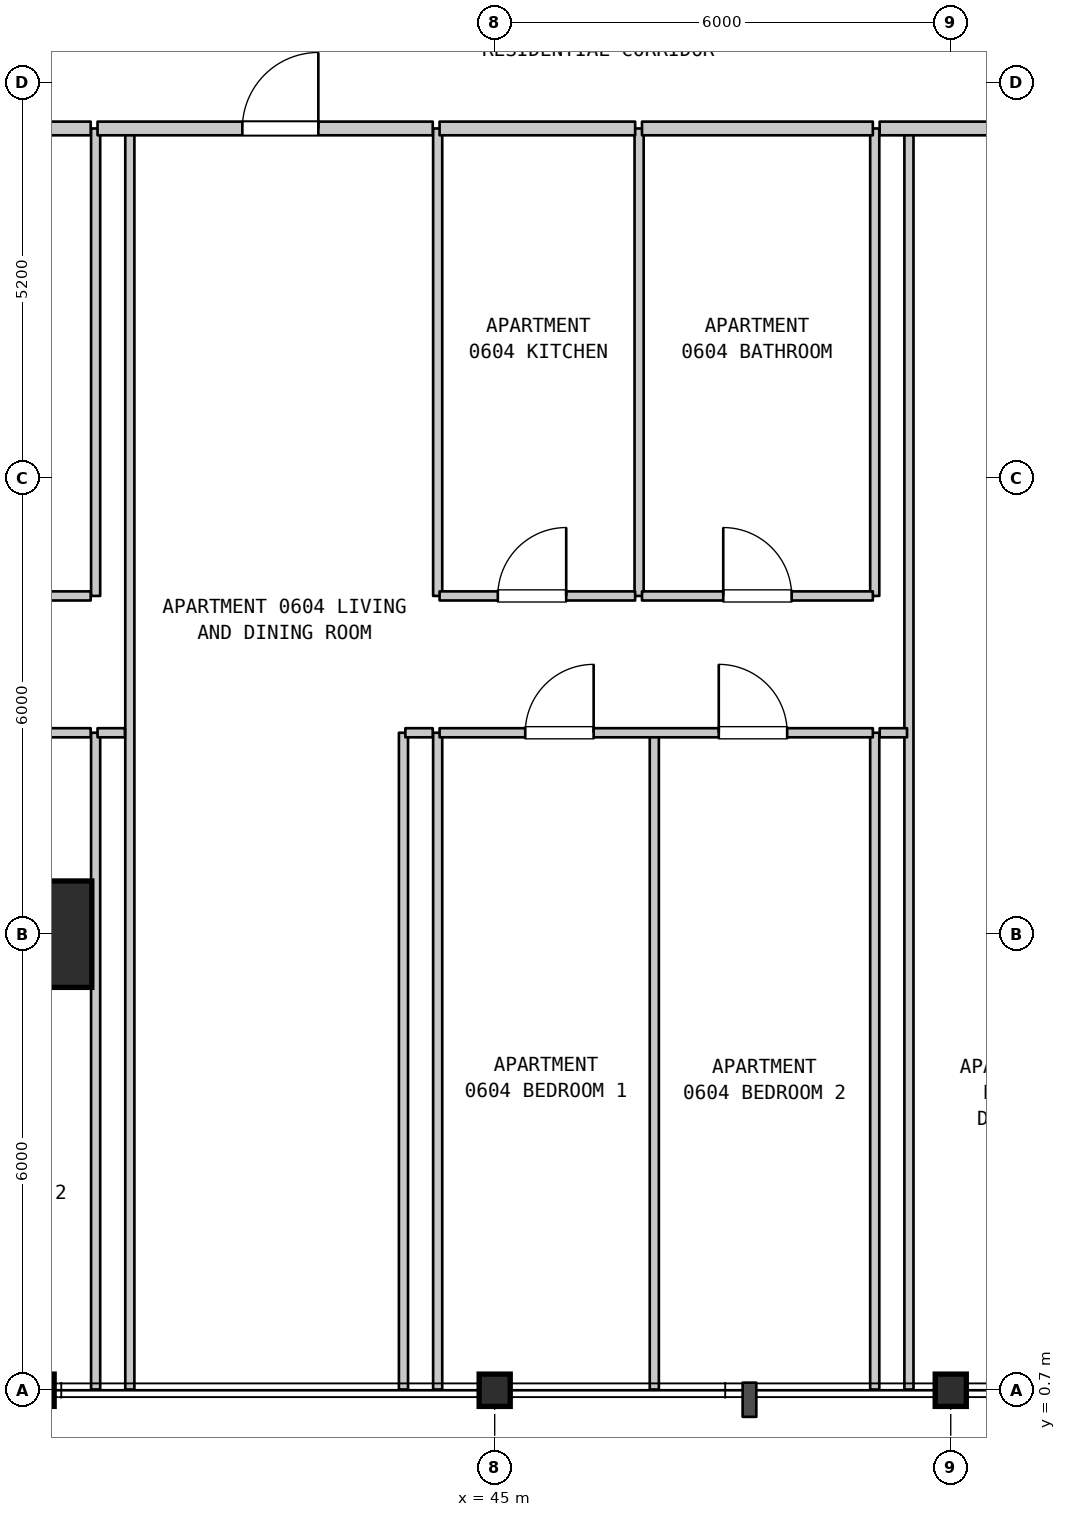
"""IFC4 building model, lengths in metres.
Left out: names, types, materials, properties, quantities, classifications, styles, units other than length and angle.
Written with IfcOpenShell. Run it as: python <this file> out.ifc"""

import sys

from ifc_helpers import new_model, si_unit, direction, frame, frame_2d, origin, origin_2d, place, context, subcontext, project, spatial, rectangle, i_section, extrude, element, fill, save


model = new_model("IFC4")
c1 = context("Model", 3, precision=1e-05, world=origin(), true_north=direction((0.0, 1.0)))
c2 = subcontext(c1, "Body", "Model", "MODEL_VIEW")
j1 = project(units=[si_unit("LENGTHUNIT", "METRE"), si_unit("PLANEANGLEUNIT", "RADIAN")], contexts=[c1])
p1 = place(None, origin())
s1 = spatial("IfcSite", under=j1, at=p1, CompositionType="ELEMENT")
p2 = place(p1, origin())
s2 = spatial("IfcBuilding", under=s1, at=p2, CompositionType="ELEMENT")
p3 = place(p2, frame((0.0, 0.0, 31.4)))
s3 = spatial("IfcBuildingStorey", under=s2, at=p3, CompositionType="ELEMENT", Elevation=31.4)
p4 = place(p3, frame((39.0, 0.7, 0.0), z_axis=(0.0, 0.0, 1.0), x_axis=(1.0, 0.0, 0.0)))
e1 = element("IfcColumn", 1, at=p4, inside=s3, PredefinedType="COLUMN", context=c2, shape_type="SweptSolid", body=[
    extrude(i_section(OverallWidth=0.409, OverallDepth=0.425, WebThickness=0.032, FlangeThickness=0.052, FilletRadius=0.015, at=origin_2d()), origin(), (0.0, 0.0, 1.0), 3.7),
])
p5 = place(p3, frame((39.0, 6.7, 0.0), z_axis=(0.0, 0.0, 1.0), x_axis=(1.0, 0.0, 0.0)))
e2 = element("IfcColumn", 2, at=p5, inside=s3, PredefinedType="COLUMN", context=c2, shape_type="SweptSolid", body=[
    extrude(rectangle(XDim=1.4, YDim=1.4, at=origin_2d()), origin(), (0.0, 0.0, 1.0), 3.7),
])
for number, where, z_axis, x_axis in (
    (3, (45.0, 0.7, 0.0), (0.0, 0.0, 1.0), (1.0, 0.0, 0.0)),
    (4, (51.0, 0.7, 0.0), (0.0, 0.0, 1.0), (1.0, 0.0, 0.0)),
):
    element("IfcColumn", number, at=place(p3, frame(where, z_axis=z_axis, x_axis=x_axis)), inside=s3, PredefinedType="COLUMN", context=c2, shape_type="SweptSolid", body=[
        extrude(i_section(OverallWidth=0.409, OverallDepth=0.425, WebThickness=0.032, FlangeThickness=0.052, FilletRadius=0.015, at=origin_2d()), origin(), (0.0, 0.0, 1.0), 3.7),
    ])
p6 = place(p3, frame((39.75, 0.71, 0.0), z_axis=(0.0, 0.0, 1.0), x_axis=(0.0, 1.0, 0.0)))
e5 = element("IfcWall", 5, at=p6, inside=s3, PredefinedType="PARTITIONING", context=c2, shape_type="SweptSolid", body=[
    extrude(rectangle(XDim=8.64, YDim=0.12, at=frame_2d((4.32, 0.0))), origin(), (0.0, 0.0, 1.0), 3.385),
])
p7 = place(p3, frame((39.75, 11.15, 0.0), z_axis=(0.0, 0.0, 1.0), x_axis=(0.0, 1.0, 0.0)))
e6 = element("IfcWall", 6, at=p7, inside=s3, PredefinedType="PARTITIONING", context=c2, shape_type="SweptSolid", body=[
    extrude(rectangle(XDim=6.15, YDim=0.12, at=frame_2d((3.075, 0.0))), origin(), (0.0, 0.0, 1.0), 3.385),
])
p8 = place(p3, frame((40.2, 0.71, 0.0), z_axis=(0.0, 0.0, 1.0), x_axis=(0.0, 1.0, 0.0)))
e7 = element("IfcWall", 7, at=p8, inside=s3, PredefinedType="PARTITIONING", context=c2, shape_type="SweptSolid", body=[
    extrude(rectangle(XDim=16.59, YDim=0.12, at=frame_2d((8.295, 0.0))), origin(), (0.0, 0.0, 1.0), 3.385),
])
for number, where, z_axis, x_axis in (
    (8, (43.8, 0.71, 0.0), (0.0, 0.0, 1.0), (0.0, 1.0, 0.0)),
    (9, (44.25, 0.71, 0.0), (0.0, 0.0, 1.0), (0.0, 1.0, 0.0)),
):
    element("IfcWall", number, at=place(p3, frame(where, z_axis=z_axis, x_axis=x_axis)), inside=s3, PredefinedType="PARTITIONING", context=c2, shape_type="SweptSolid", body=[
        extrude(rectangle(XDim=8.64, YDim=0.12, at=frame_2d((4.32, 0.0))), origin(), (0.0, 0.0, 1.0), 3.385),
    ])
for number, where, z_axis, x_axis in (
    (10, (44.25, 11.15, 0.0), (0.0, 0.0, 1.0), (0.0, 1.0, 0.0)),
    (11, (46.9, 11.15, 0.0), (0.0, 0.0, 1.0), (0.0, 1.0, 0.0)),
):
    element("IfcWall", number, at=place(p3, frame(where, z_axis=z_axis, x_axis=x_axis)), inside=s3, PredefinedType="PARTITIONING", context=c2, shape_type="SweptSolid", body=[
        extrude(rectangle(XDim=6.15, YDim=0.12, at=frame_2d((3.075, 0.0))), origin(), (0.0, 0.0, 1.0), 3.385),
    ])
for number, where, z_axis, x_axis in (
    (12, (47.1, 0.71, 0.0), (0.0, 0.0, 1.0), (0.0, 1.0, 0.0)),
    (13, (50.0, 0.71, 0.0), (0.0, 0.0, 1.0), (0.0, 1.0, 0.0)),
):
    element("IfcWall", number, at=place(p3, frame(where, z_axis=z_axis, x_axis=x_axis)), inside=s3, PredefinedType="PARTITIONING", context=c2, shape_type="SweptSolid", body=[
        extrude(rectangle(XDim=8.64, YDim=0.12, at=frame_2d((4.32, 0.0))), origin(), (0.0, 0.0, 1.0), 3.385),
    ])
p9 = place(p3, frame((50.0, 11.15, 0.0), z_axis=(0.0, 0.0, 1.0), x_axis=(0.0, 1.0, 0.0)))
e14 = element("IfcWall", 14, at=p9, inside=s3, PredefinedType="PARTITIONING", context=c2, shape_type="SweptSolid", body=[
    extrude(rectangle(XDim=6.15, YDim=0.12, at=frame_2d((3.075, 0.0))), origin(), (0.0, 0.0, 1.0), 3.385),
])
p10 = place(p3, frame((50.45, 0.71, 0.0), z_axis=(0.0, 0.0, 1.0), x_axis=(0.0, 1.0, 0.0)))
e15 = element("IfcWall", 15, at=p10, inside=s3, PredefinedType="PARTITIONING", context=c2, shape_type="SweptSolid", body=[
    extrude(rectangle(XDim=16.59, YDim=0.12, at=frame_2d((8.295, 0.0))), origin(), (0.0, 0.0, 1.0), 3.385),
])
p11 = place(p3, frame((33.985, 9.35, 0.0), z_axis=(0.0, 0.0, 1.0), x_axis=(1.0, 0.0, 0.0)))
e16 = element("IfcWall", 16, at=p11, inside=s3, PredefinedType="PARTITIONING", context=c2, shape_type="SweptSolid", body=[
    extrude(rectangle(XDim=5.7, YDim=0.12, at=frame_2d((2.85, 0.0))), origin(), (0.0, 0.0, 1.0), 3.385),
])
p12 = place(p11, frame((1.127, 0.0, 0.0)))
e17 = element("IfcOpeningElement", 17, at=p12, cuts=e16, PredefinedType="OPENING", context=c2, shape_type="SweptSolid", body=[
    extrude(rectangle(XDim=0.9, YDim=2.15, at=frame_2d((0.45, 1.075))), frame((0.0, 0.07, 0.0), z_axis=(0.0, -1.0, 0.0), x_axis=(1.0, 0.0, 0.0)), (0.0, 0.0, 1.0), 0.14),
])
p13 = place(p11, frame((3.673, 0.0, 0.0)))
e18 = element("IfcOpeningElement", 18, at=p13, cuts=e16, PredefinedType="OPENING", context=c2, shape_type="SweptSolid", body=[
    extrude(rectangle(XDim=0.9, YDim=2.15, at=frame_2d((0.45, 1.075))), frame((0.0, 0.07, 0.0), z_axis=(0.0, -1.0, 0.0), x_axis=(1.0, 0.0, 0.0)), (0.0, 0.0, 1.0), 0.14),
])
for number, where, z_axis, x_axis in (
    (19, (39.775, 9.35, 0.0), (0.0, 0.0, 1.0), (1.0, 0.0, 0.0)),
    (20, (43.825, 9.35, 0.0), (0.0, 0.0, 1.0), (1.0, 0.0, 0.0)),
):
    element("IfcWall", number, at=place(p3, frame(where, z_axis=z_axis, x_axis=x_axis)), inside=s3, PredefinedType="PARTITIONING", context=c2, shape_type="SweptSolid", body=[
        extrude(rectangle(XDim=0.36, YDim=0.12, at=frame_2d((0.18, 0.0))), origin(), (0.0, 0.0, 1.0), 3.385),
    ])
p14 = place(p3, frame((44.275, 9.35, 0.0), z_axis=(0.0, 0.0, 1.0), x_axis=(1.0, 0.0, 0.0)))
e21 = element("IfcWall", 21, at=p14, inside=s3, PredefinedType="PARTITIONING", context=c2, shape_type="SweptSolid", body=[
    extrude(rectangle(XDim=5.7, YDim=0.12, at=frame_2d((2.85, 0.0))), origin(), (0.0, 0.0, 1.0), 3.385),
])
p15 = place(p14, frame((1.127, 0.0, 0.0)))
e22 = element("IfcOpeningElement", 22, at=p15, cuts=e21, PredefinedType="OPENING", context=c2, shape_type="SweptSolid", body=[
    extrude(rectangle(XDim=0.9, YDim=2.15, at=frame_2d((0.45, 1.075))), frame((0.0, 0.07, 0.0), z_axis=(0.0, -1.0, 0.0), x_axis=(1.0, 0.0, 0.0)), (0.0, 0.0, 1.0), 0.14),
])
p16 = place(p14, frame((3.673, 0.0, 0.0)))
e23 = element("IfcOpeningElement", 23, at=p16, cuts=e21, PredefinedType="OPENING", context=c2, shape_type="SweptSolid", body=[
    extrude(rectangle(XDim=0.9, YDim=2.15, at=frame_2d((0.45, 1.075))), frame((0.0, 0.07, 0.0), z_axis=(0.0, -1.0, 0.0), x_axis=(1.0, 0.0, 0.0)), (0.0, 0.0, 1.0), 0.14),
])
p17 = place(p3, frame((50.065, 9.35, 0.0), z_axis=(0.0, 0.0, 1.0), x_axis=(1.0, 0.0, 0.0)))
e24 = element("IfcWall", 24, at=p17, inside=s3, PredefinedType="PARTITIONING", context=c2, shape_type="SweptSolid", body=[
    extrude(rectangle(XDim=0.36, YDim=0.12, at=frame_2d((0.18, 0.0))), origin(), (0.0, 0.0, 1.0), 3.385),
])
p18 = place(p3, frame((36.648, 11.15, 0.0), z_axis=(0.0, 0.0, 1.0), x_axis=(1.0, 0.0, 0.0)))
e25 = element("IfcWall", 25, at=p18, inside=s3, PredefinedType="PARTITIONING", context=c2, shape_type="SweptSolid", body=[
    extrude(rectangle(XDim=3.037, YDim=0.12, at=frame_2d((1.519, 0.0))), origin(), (0.0, 0.0, 1.0), 3.385),
])
p19 = place(p18, frame((1.068, 0.0, 0.0)))
e26 = element("IfcOpeningElement", 26, at=p19, cuts=e25, PredefinedType="OPENING", context=c2, shape_type="SweptSolid", body=[
    extrude(rectangle(XDim=0.9, YDim=2.1, at=frame_2d((0.45, 1.05))), frame((0.0, 0.07, 0.0), z_axis=(0.0, -1.0, 0.0), x_axis=(1.0, 0.0, 0.0)), (0.0, 0.0, 1.0), 0.14),
])
p20 = place(p3, frame((44.275, 11.15, 0.0), z_axis=(0.0, 0.0, 1.0), x_axis=(1.0, 0.0, 0.0)))
e27 = element("IfcWall", 27, at=p20, inside=s3, PredefinedType="PARTITIONING", context=c2, shape_type="SweptSolid", body=[
    extrude(rectangle(XDim=2.573, YDim=0.12, at=frame_2d((1.287, 0.0))), origin(), (0.0, 0.0, 1.0), 3.385),
])
p21 = place(p20, frame((0.766, 0.0, 0.0)))
e28 = element("IfcOpeningElement", 28, at=p21, cuts=e27, PredefinedType="OPENING", context=c2, shape_type="SweptSolid", body=[
    extrude(rectangle(XDim=0.9, YDim=2.15, at=frame_2d((0.45, 1.075))), frame((0.0, 0.07, 0.0), z_axis=(0.0, -1.0, 0.0), x_axis=(1.0, 0.0, 0.0)), (0.0, 0.0, 1.0), 0.14),
])
p22 = place(p3, frame((46.938, 11.15, 0.0), z_axis=(0.0, 0.0, 1.0), x_axis=(1.0, 0.0, 0.0)))
e29 = element("IfcWall", 29, at=p22, inside=s3, PredefinedType="PARTITIONING", context=c2, shape_type="SweptSolid", body=[
    extrude(rectangle(XDim=3.037, YDim=0.12, at=frame_2d((1.519, 0.0))), origin(), (0.0, 0.0, 1.0), 3.385),
])
p23 = place(p22, frame((1.069, 0.0, 0.0)))
e30 = element("IfcOpeningElement", 30, at=p23, cuts=e29, PredefinedType="OPENING", context=c2, shape_type="SweptSolid", body=[
    extrude(rectangle(XDim=0.9, YDim=2.1, at=frame_2d((0.45, 1.05))), frame((0.0, 0.07, 0.0), z_axis=(0.0, -1.0, 0.0), x_axis=(1.0, 0.0, 0.0)), (0.0, 0.0, 1.0), 0.14),
])
p24 = place(p3, frame((36.648, 17.3, 0.0), z_axis=(0.0, 0.0, 1.0), x_axis=(1.0, 0.0, 0.0)))
e31 = element("IfcWall", 31, at=p24, inside=s3, PredefinedType="STANDARD", context=c2, shape_type="SweptSolid", body=[
    extrude(rectangle(XDim=3.037, YDim=0.18, at=frame_2d((1.519, 0.0))), origin(), (0.0, 0.0, 1.0), 3.385),
])
p25 = place(p3, frame((39.775, 17.3, 0.0), z_axis=(0.0, 0.0, 1.0), x_axis=(1.0, 0.0, 0.0)))
e32 = element("IfcWall", 32, at=p25, inside=s3, PredefinedType="STANDARD", context=c2, shape_type="SweptSolid", body=[
    extrude(rectangle(XDim=4.41, YDim=0.18, at=frame_2d((2.205, 0.0))), origin(), (0.0, 0.0, 1.0), 3.385),
])
p26 = place(p25, frame((1.905, 0.0, 0.0)))
e33 = element("IfcOpeningElement", 33, at=p26, cuts=e32, PredefinedType="OPENING", context=c2, shape_type="SweptSolid", body=[
    extrude(rectangle(XDim=1.0, YDim=2.15, at=frame_2d((0.5, 1.075))), frame((0.0, 0.1, 0.0), z_axis=(0.0, -1.0, 0.0), x_axis=(1.0, 0.0, 0.0)), (0.0, 0.0, 1.0), 0.2),
])
p27 = place(p3, frame((44.275, 17.3, 0.0), z_axis=(0.0, 0.0, 1.0), x_axis=(1.0, 0.0, 0.0)))
e34 = element("IfcWall", 34, at=p27, inside=s3, PredefinedType="STANDARD", context=c2, shape_type="SweptSolid", body=[
    extrude(rectangle(XDim=2.573, YDim=0.18, at=frame_2d((1.287, 0.0))), origin(), (0.0, 0.0, 1.0), 3.385),
])
p28 = place(p3, frame((46.938, 17.3, 0.0), z_axis=(0.0, 0.0, 1.0), x_axis=(1.0, 0.0, 0.0)))
e35 = element("IfcWall", 35, at=p28, inside=s3, PredefinedType="STANDARD", context=c2, shape_type="SweptSolid", body=[
    extrude(rectangle(XDim=3.037, YDim=0.18, at=frame_2d((1.519, 0.0))), origin(), (0.0, 0.0, 1.0), 3.385),
])
p29 = place(p3, frame((50.065, 17.3, 0.0), z_axis=(0.0, 0.0, 1.0), x_axis=(1.0, 0.0, 0.0)))
e36 = element("IfcWall", 36, at=p29, inside=s3, PredefinedType="STANDARD", context=c2, shape_type="SweptSolid", body=[
    extrude(rectangle(XDim=3.96, YDim=0.18, at=frame_2d((1.98, 0.0))), origin(), (0.0, 0.0, 1.0), 3.385),
])
p30 = place(p29, frame((1.609, 0.0, 0.0)))
e37 = element("IfcOpeningElement", 37, at=p30, cuts=e36, PredefinedType="OPENING", context=c2, shape_type="SweptSolid", body=[
    extrude(rectangle(XDim=1.0, YDim=2.15, at=frame_2d((0.5, 1.075))), frame((0.0, 0.1, 0.0), z_axis=(0.0, -1.0, 0.0), x_axis=(1.0, 0.0, 0.0)), (0.0, 0.0, 1.0), 0.2),
])
p31 = place(p15, origin())
e38 = element("IfcDoor", 38, at=p31, inside=s3, OperationType="SINGLE_SWING_RIGHT", PredefinedType="DOOR", context=c2, shape_type="SweptSolid", body=[
    extrude(rectangle(XDim=0.9, YDim=2.15, at=frame_2d((0.45, 1.075))), frame((0.0, 0.025, 0.0), z_axis=(0.0, -1.0, 0.0), x_axis=(1.0, 0.0, 0.0)), (0.0, 0.0, 1.0), 0.05),
])
fill(e22, e38)
p32 = place(p16, origin())
e39 = element("IfcDoor", 39, at=p32, inside=s3, OperationType="SINGLE_SWING_LEFT", PredefinedType="DOOR", context=c2, shape_type="SweptSolid", body=[
    extrude(rectangle(XDim=0.9, YDim=2.15, at=frame_2d((0.45, 1.075))), frame((0.0, 0.025, 0.0), z_axis=(0.0, -1.0, 0.0), x_axis=(1.0, 0.0, 0.0)), (0.0, 0.0, 1.0), 0.05),
])
fill(e23, e39)
p33 = place(p21, origin())
e40 = element("IfcDoor", 40, at=p33, inside=s3, OperationType="SINGLE_SWING_RIGHT", PredefinedType="DOOR", context=c2, shape_type="SweptSolid", body=[
    extrude(rectangle(XDim=0.9, YDim=2.15, at=frame_2d((0.45, 1.075))), frame((0.0, 0.025, 0.0), z_axis=(0.0, -1.0, 0.0), x_axis=(1.0, 0.0, 0.0)), (0.0, 0.0, 1.0), 0.05),
])
fill(e28, e40)
p34 = place(p23, origin())
e41 = element("IfcDoor", 41, at=p34, inside=s3, OperationType="SINGLE_SWING_LEFT", PredefinedType="DOOR", context=c2, shape_type="SweptSolid", body=[
    extrude(rectangle(XDim=0.9, YDim=2.1, at=frame_2d((0.45, 1.05))), frame((0.0, 0.025, 0.0), z_axis=(0.0, -1.0, 0.0), x_axis=(1.0, 0.0, 0.0)), (0.0, 0.0, 1.0), 0.05),
])
fill(e30, e41)
p35 = place(p26, origin())
e42 = element("IfcDoor", 42, at=p35, inside=s3, OperationType="SINGLE_SWING_RIGHT", PredefinedType="DOOR", context=c2, shape_type="SweptSolid", body=[
    extrude(rectangle(XDim=1.0, YDim=2.15, at=frame_2d((0.5, 1.075))), frame((0.0, 0.025, 0.0), z_axis=(0.0, -1.0, 0.0), x_axis=(1.0, 0.0, 0.0)), (0.0, 0.0, 1.0), 0.05),
])
fill(e33, e42)
save(model, sys.argv[1])
